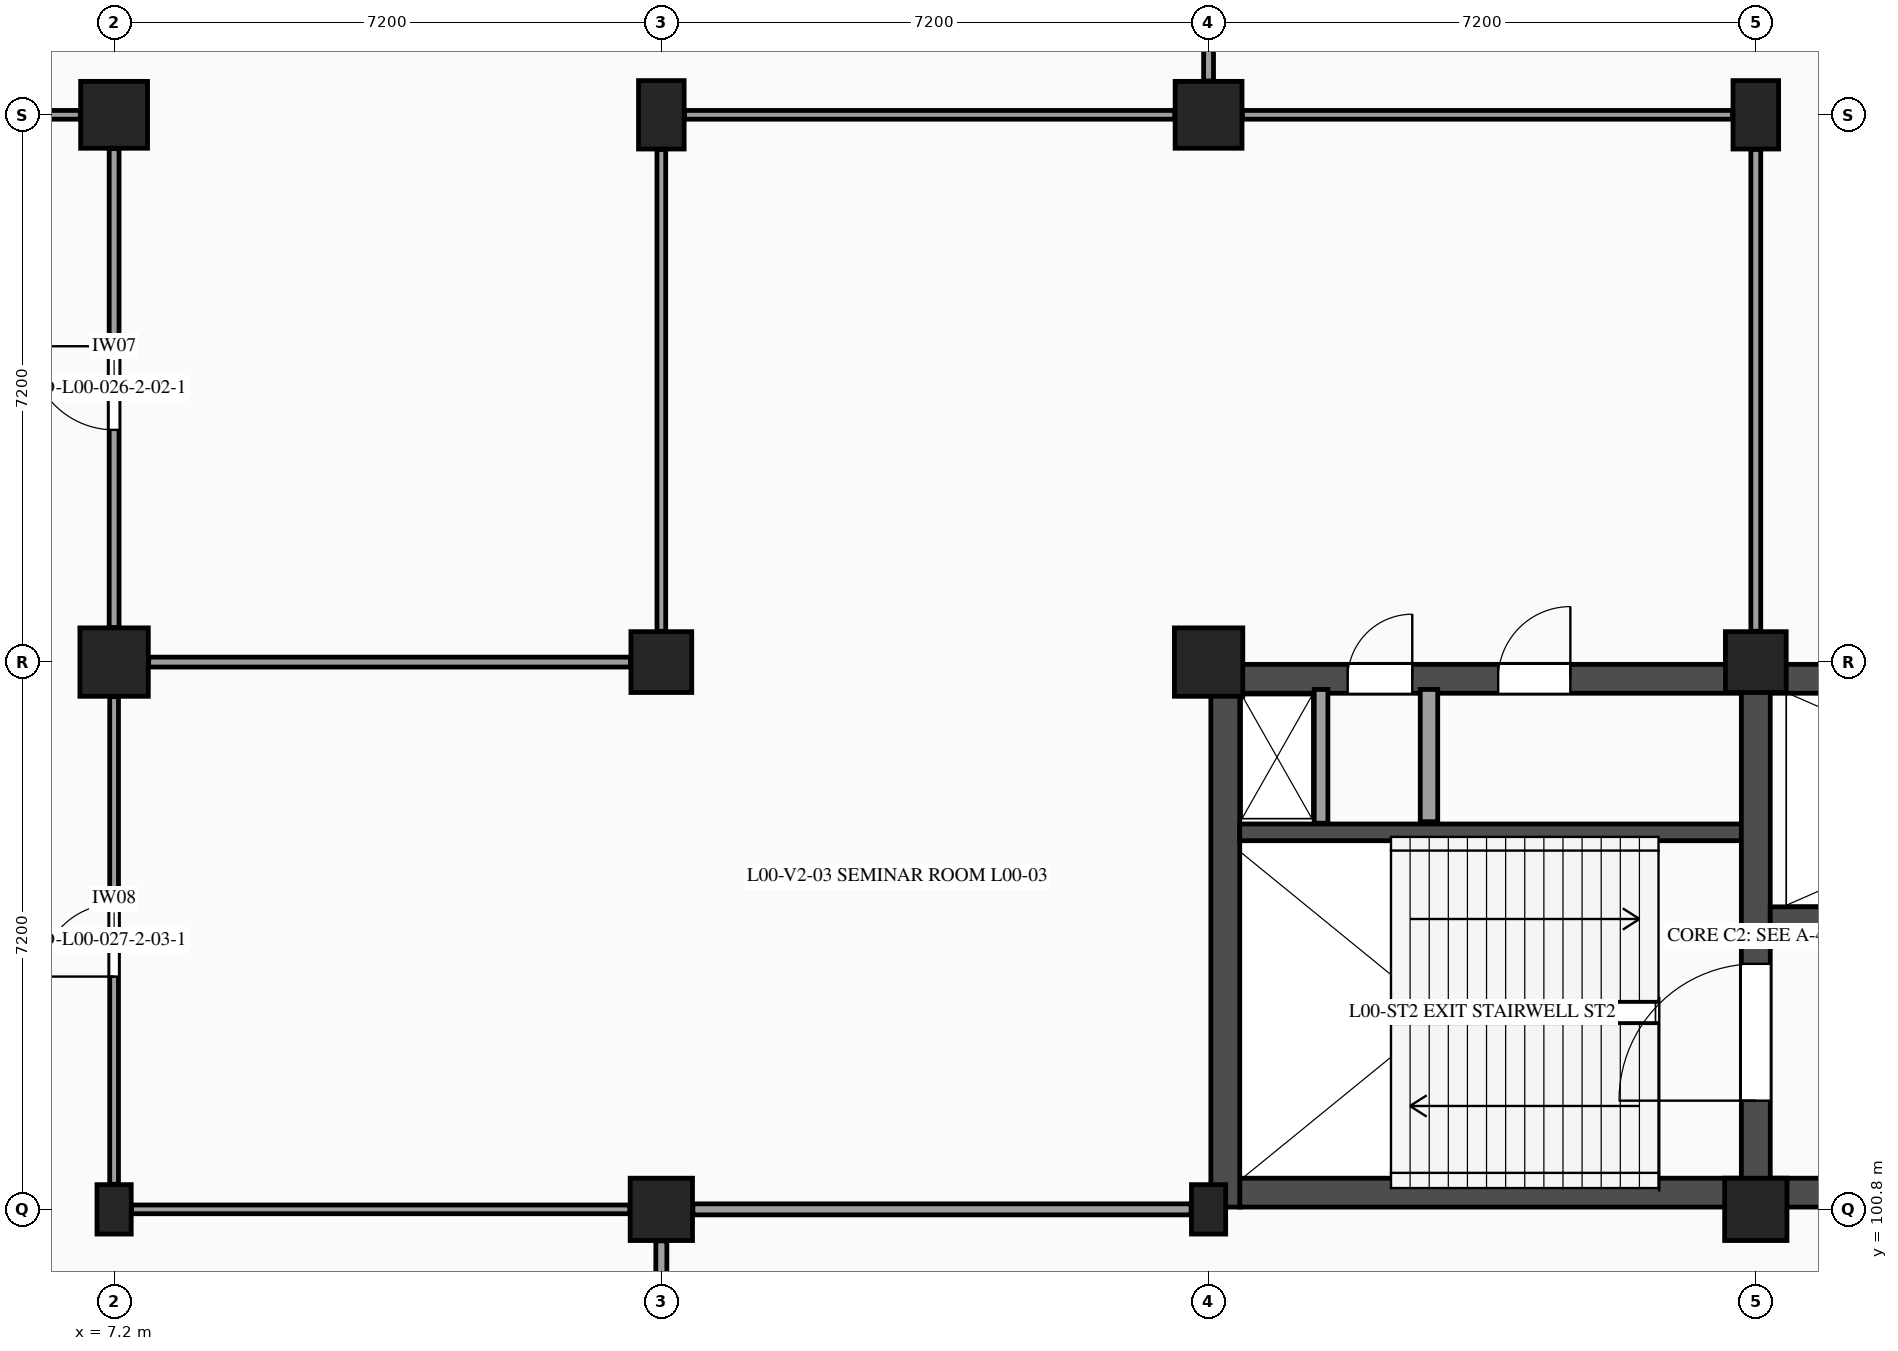
"""IFC4 building model, lengths in metres.
Left out: names, types, materials, properties, quantities, classifications, styles, units other than length and angle.
Written with IfcOpenShell. Run it as: python <this file> out.ifc"""

import sys

from ifc_helpers import new_model, si_unit, direction, frame, frame_2d, origin, origin_2d, place, context, subcontext, project, spatial, rectangle, extrude, element, fill, save


model = new_model("IFC4")
c1 = context("Model", 3, precision=1e-05, world=origin(), true_north=direction((0.0, 1.0)))
c2 = subcontext(c1, "Body", "Model", "MODEL_VIEW")
j1 = project(units=[si_unit("LENGTHUNIT", "METRE"), si_unit("PLANEANGLEUNIT", "RADIAN")], contexts=[c1])
p1 = place(None, origin())
s1 = spatial("IfcSite", under=j1, at=p1, CompositionType="ELEMENT")
p2 = place(p1, origin())
s2 = spatial("IfcBuilding", under=s1, at=p2, CompositionType="ELEMENT")
p3 = place(p2, origin())
s3 = spatial("IfcBuildingStorey", under=s2, at=p3, CompositionType="ELEMENT", Elevation=0.0)
p4 = place(p3, frame((7.2, 100.8, 0.0), z_axis=(0.0, 0.0, 1.0), x_axis=(1.0, 0.0, 0.0)))
e1 = element("IfcColumn", 1, at=p4, inside=s3, PredefinedType="PILASTER", context=c2, shape_type="SweptSolid", body=[
    extrude(rectangle(XDim=0.45, YDim=0.65, at=origin_2d()), origin(), (0.0, 0.0, 1.0), 5.4),
])
p5 = place(p3, frame((7.2, 108.0, 0.0), z_axis=(0.0, 0.0, 1.0), x_axis=(1.0, 0.0, 0.0)))
e2 = element("IfcColumn", 2, at=p5, inside=s3, PredefinedType="COLUMN", context=c2, shape_type="SweptSolid", body=[
    extrude(rectangle(XDim=0.9, YDim=0.9, at=origin_2d()), origin(), (0.0, 0.0, 1.0), 5.4),
])
p6 = place(p3, frame((7.2, 115.2, 0.0), z_axis=(0.0, 0.0, 1.0), x_axis=(1.0, 0.0, 0.0)))
e3 = element("IfcColumn", 3, at=p6, inside=s3, PredefinedType="COLUMN", context=c2, shape_type="SweptSolid", body=[
    extrude(rectangle(XDim=0.88, YDim=0.88, at=origin_2d()), origin(), (0.0, 0.0, 1.0), 5.4),
])
p7 = place(p3, frame((14.4, 100.8, 0.0), z_axis=(0.0, 0.0, 1.0), x_axis=(1.0, 0.0, 0.0)))
e4 = element("IfcColumn", 4, at=p7, inside=s3, PredefinedType="COLUMN", context=c2, shape_type="SweptSolid", body=[
    extrude(rectangle(XDim=0.82, YDim=0.82, at=origin_2d()), origin(), (0.0, 0.0, 1.0), 5.4),
])
p8 = place(p3, frame((14.4, 108.0, 0.0), z_axis=(0.0, 0.0, 1.0), x_axis=(1.0, 0.0, 0.0)))
e5 = element("IfcColumn", 5, at=p8, inside=s3, PredefinedType="COLUMN", context=c2, shape_type="SweptSolid", body=[
    extrude(rectangle(XDim=0.8, YDim=0.8, at=origin_2d()), origin(), (0.0, 0.0, 1.0), 5.4),
])
p9 = place(p3, frame((14.4, 115.2, 0.0), z_axis=(0.0, 0.0, 1.0), x_axis=(1.0, 0.0, 0.0)))
e6 = element("IfcColumn", 6, at=p9, inside=s3, PredefinedType="COLUMN", context=c2, shape_type="SweptSolid", body=[
    extrude(rectangle(XDim=0.6, YDim=0.9, at=origin_2d()), origin(), (0.0, 0.0, 1.0), 5.4),
])
p10 = place(p3, frame((21.6, 100.8, 0.0), z_axis=(0.0, 0.0, 1.0), x_axis=(1.0, 0.0, 0.0)))
e7 = element("IfcColumn", 7, at=p10, inside=s3, PredefinedType="PILASTER", context=c2, shape_type="SweptSolid", body=[
    extrude(rectangle(XDim=0.45, YDim=0.65, at=origin_2d()), origin(), (0.0, 0.0, 1.0), 5.4),
])
p11 = place(p3, frame((21.6, 108.0, 0.0), z_axis=(0.0, 0.0, 1.0), x_axis=(1.0, 0.0, 0.0)))
e8 = element("IfcColumn", 8, at=p11, inside=s3, PredefinedType="COLUMN", context=c2, shape_type="SweptSolid", body=[
    extrude(rectangle(XDim=0.9, YDim=0.9, at=origin_2d()), origin(), (0.0, 0.0, 1.0), 5.4),
])
p12 = place(p3, frame((21.6, 115.2, 0.0), z_axis=(0.0, 0.0, 1.0), x_axis=(1.0, 0.0, 0.0)))
e9 = element("IfcColumn", 9, at=p12, inside=s3, PredefinedType="COLUMN", context=c2, shape_type="SweptSolid", body=[
    extrude(rectangle(XDim=0.88, YDim=0.88, at=origin_2d()), origin(), (0.0, 0.0, 1.0), 5.4),
])
p13 = place(p3, frame((28.8, 100.8, 0.0), z_axis=(0.0, 0.0, 1.0), x_axis=(1.0, 0.0, 0.0)))
e10 = element("IfcColumn", 10, at=p13, inside=s3, PredefinedType="COLUMN", context=c2, shape_type="SweptSolid", body=[
    extrude(rectangle(XDim=0.82, YDim=0.82, at=origin_2d()), origin(), (0.0, 0.0, 1.0), 5.4),
])
p14 = place(p3, frame((28.8, 108.0, 0.0), z_axis=(0.0, 0.0, 1.0), x_axis=(1.0, 0.0, 0.0)))
e11 = element("IfcColumn", 11, at=p14, inside=s3, PredefinedType="COLUMN", context=c2, shape_type="SweptSolid", body=[
    extrude(rectangle(XDim=0.8, YDim=0.8, at=origin_2d()), origin(), (0.0, 0.0, 1.0), 5.4),
])
p15 = place(p3, frame((28.8, 115.2, 0.0), z_axis=(0.0, 0.0, 1.0), x_axis=(1.0, 0.0, 0.0)))
e12 = element("IfcColumn", 12, at=p15, inside=s3, PredefinedType="COLUMN", context=c2, shape_type="SweptSolid", body=[
    extrude(rectangle(XDim=0.6, YDim=0.9, at=origin_2d()), origin(), (0.0, 0.0, 1.0), 5.4),
])
p16 = place(p3, frame((22.01, 101.02, 0.0), z_axis=(0.0, 0.0, 1.0), x_axis=(1.0, 0.0, 0.0)))
e13 = element("IfcWall", 13, at=p16, inside=s3, PredefinedType="SHEAR", context=c2, shape_type="SweptSolid", body=[
    extrude(rectangle(XDim=6.6, YDim=0.38, at=frame_2d((3.3, 0.0))), origin(), (0.0, 0.0, 1.0), 5.09),
])
p17 = place(p3, frame((21.82, 107.97, 0.0), z_axis=(0.0, 0.0, 1.0), x_axis=(0.0, -1.0, 0.0)))
e14 = element("IfcWall", 14, at=p17, inside=s3, PredefinedType="SHEAR", context=c2, shape_type="SweptSolid", body=[
    extrude(rectangle(XDim=7.14, YDim=0.38, at=frame_2d((3.57, 0.0))), origin(), (0.0, 0.0, 1.0), 5.09),
])
p18 = place(p3, frame((22.01, 107.78, 0.0), z_axis=(0.0, 0.0, 1.0), x_axis=(1.0, 0.0, 0.0)))
e15 = element("IfcWall", 15, at=p18, inside=s3, PredefinedType="SHEAR", context=c2, shape_type="SweptSolid", body=[
    extrude(rectangle(XDim=6.6, YDim=0.38, at=frame_2d((3.3, 0.0))), origin(), (0.0, 0.0, 1.0), 5.09),
])
p19 = place(p18, frame((1.42, 0.0, 0.0)))
e16 = element("IfcOpeningElement", 16, at=p19, cuts=e15, PredefinedType="OPENING", context=c2, shape_type="SweptSolid", body=[
    extrude(rectangle(XDim=0.85, YDim=2.1, at=frame_2d((0.425, 1.05))), frame((0.0, 0.2, 0.0), z_axis=(0.0, -1.0, 0.0), x_axis=(1.0, 0.0, 0.0)), (0.0, 0.0, 1.0), 0.4),
])
p20 = place(p18, frame((3.4, 0.0, 0.0)))
e17 = element("IfcOpeningElement", 17, at=p20, cuts=e15, PredefinedType="OPENING", context=c2, shape_type="SweptSolid", body=[
    extrude(rectangle(XDim=0.95, YDim=2.15, at=frame_2d((0.475, 1.075))), frame((0.0, 0.2, 0.0), z_axis=(0.0, -1.0, 0.0), x_axis=(1.0, 0.0, 0.0)), (0.0, 0.0, 1.0), 0.4),
])
p21 = place(p3, frame((22.01, 105.76, 0.0), z_axis=(0.0, 0.0, 1.0), x_axis=(1.0, 0.0, 0.0)))
e18 = element("IfcWall", 18, at=p21, inside=s3, PredefinedType="SHEAR", context=c2, shape_type="SweptSolid", body=[
    extrude(rectangle(XDim=6.6, YDim=0.22, at=frame_2d((3.3, 0.0))), origin(), (0.0, 0.0, 1.0), 5.09),
])
p22 = place(p3, frame((24.5, 105.9, 0.0), z_axis=(0.0, 0.0, 1.0), x_axis=(0.0, 1.0, 0.0)))
e19 = element("IfcWall", 19, at=p22, inside=s3, PredefinedType="PARTITIONING", context=c2, shape_type="SweptSolid", body=[
    extrude(rectangle(XDim=1.74, YDim=0.23, at=frame_2d((0.87, 0.0))), origin(), (0.0, 0.0, 1.0), 5.09),
])
p23 = place(p3, frame((23.08, 105.88, 0.0), z_axis=(0.0, 0.0, 1.0), x_axis=(0.0, 1.0, 0.0)))
e20 = element("IfcWall", 20, at=p23, inside=s3, PredefinedType="PARTITIONING", context=c2, shape_type="SweptSolid", body=[
    extrude(rectangle(XDim=1.76, YDim=0.18, at=frame_2d((0.88, 0.0))), origin(), (0.0, 0.0, 1.0), 5.09),
])
p24 = place(p3, frame((28.8, 100.83, 0.0), z_axis=(0.0, 0.0, 1.0), x_axis=(0.0, 1.0, 0.0)))
e21 = element("IfcWall", 21, at=p24, inside=s3, PredefinedType="SHEAR", context=c2, shape_type="SweptSolid", body=[
    extrude(rectangle(XDim=7.14, YDim=0.38, at=frame_2d((3.57, 0.0))), origin(), (0.0, 0.0, 1.0), 5.09),
])
p25 = place(p24, frame((1.4, 0.0, 0.0)))
e22 = element("IfcOpeningElement", 22, at=p25, cuts=e21, PredefinedType="OPENING", context=c2, shape_type="SweptSolid", body=[
    extrude(rectangle(XDim=1.8, YDim=2.2, at=frame_2d((0.9, 1.1))), frame((0.0, 0.2, 0.0), z_axis=(0.0, -1.0, 0.0), x_axis=(1.0, 0.0, 0.0)), (0.0, 0.0, 1.0), 0.4),
])
p26 = place(p3, frame((28.99, 101.02, 0.0), z_axis=(0.0, 0.0, 1.0), x_axis=(1.0, 0.0, 0.0)))
e23 = element("IfcWall", 23, at=p26, inside=s3, PredefinedType="SHEAR", context=c2, shape_type="SweptSolid", body=[
    extrude(rectangle(XDim=6.6, YDim=0.38, at=frame_2d((3.3, 0.0))), origin(), (0.0, 0.0, 1.0), 5.09),
])
p27 = place(p26, frame((2.22, 0.0, 0.0)))
e24 = element("IfcOpeningElement", 24, at=p27, cuts=e23, PredefinedType="OPENING", context=c2, shape_type="SweptSolid", body=[
    extrude(rectangle(XDim=1.8, YDim=2.2, at=frame_2d((0.9, 1.1))), frame((0.0, 0.2, 0.0), z_axis=(0.0, -1.0, 0.0), x_axis=(1.0, 0.0, 0.0)), (0.0, 0.0, 1.0), 0.4),
])
p28 = place(p3, frame((28.99, 107.78, 0.0), z_axis=(0.0, 0.0, 1.0), x_axis=(1.0, 0.0, 0.0)))
e25 = element("IfcWall", 25, at=p28, inside=s3, PredefinedType="SHEAR", context=c2, shape_type="SweptSolid", body=[
    extrude(rectangle(XDim=6.6, YDim=0.38, at=frame_2d((3.3, 0.0))), origin(), (0.0, 0.0, 1.0), 5.09),
])
p29 = place(p3, frame((28.99, 104.65, 0.0), z_axis=(0.0, 0.0, 1.0), x_axis=(1.0, 0.0, 0.0)))
e26 = element("IfcWall", 26, at=p29, inside=s3, PredefinedType="SHEAR", context=c2, shape_type="SweptSolid", body=[
    extrude(rectangle(XDim=6.6, YDim=0.26, at=frame_2d((3.3, 0.0))), origin(), (0.0, 0.0, 1.0), 5.09),
])
p30 = place(p29, frame((0.95, 0.0, 0.0)))
e27 = element("IfcOpeningElement", 27, at=p30, cuts=e26, PredefinedType="OPENING", context=c2, shape_type="SweptSolid", body=[
    extrude(rectangle(XDim=1.1, YDim=2.2, at=frame_2d((0.55, 1.1))), frame((0.0, 0.14, 0.0), z_axis=(0.0, -1.0, 0.0), x_axis=(1.0, 0.0, 0.0)), (0.0, 0.0, 1.0), 0.28),
])
p31 = place(p29, frame((4.1, 0.0, 0.0)))
e28 = element("IfcOpeningElement", 28, at=p31, cuts=e26, PredefinedType="OPENING", context=c2, shape_type="SweptSolid", body=[
    extrude(rectangle(XDim=1.0, YDim=2.15, at=frame_2d((0.5, 1.075))), frame((0.0, 0.14, 0.0), z_axis=(0.0, -1.0, 0.0), x_axis=(1.0, 0.0, 0.0)), (0.0, 0.0, 1.0), 0.28),
])
p32 = place(p3, frame((7.2, 101.13, 0.0), z_axis=(0.0, 0.0, 1.0), x_axis=(0.0, 1.0, 0.0)))
e29 = element("IfcWall", 29, at=p32, inside=s3, PredefinedType="PARTITIONING", context=c2, shape_type="SweptSolid", body=[
    extrude(rectangle(XDim=6.415, YDim=0.115, at=frame_2d((3.208, 0.0))), origin(), (0.0, 0.0, 1.0), 4.455),
])
p33 = place(p32, frame((2.732, 0.0, 0.0)))
e30 = element("IfcOpeningElement", 30, at=p33, cuts=e29, PredefinedType="OPENING", context=c2, shape_type="SweptSolid", body=[
    extrude(rectangle(XDim=0.95, YDim=2.15, at=frame_2d((0.475, 1.075))), frame((0.0, 0.067, 0.0), z_axis=(0.0, -1.0, 0.0), x_axis=(1.0, 0.0, 0.0)), (0.0, 0.0, 1.0), 0.135),
])
p34 = place(p3, frame((7.2, 108.455, 0.0), z_axis=(0.0, 0.0, 1.0), x_axis=(0.0, 1.0, 0.0)))
e31 = element("IfcWall", 31, at=p34, inside=s3, PredefinedType="PARTITIONING", context=c2, shape_type="SweptSolid", body=[
    extrude(rectangle(XDim=6.3, YDim=0.13, at=frame_2d((3.15, 0.0))), origin(), (0.0, 0.0, 1.0), 4.405),
])
p35 = place(p34, frame((2.6, 0.0, 0.0)))
e32 = element("IfcOpeningElement", 32, at=p35, cuts=e31, PredefinedType="OPENING", context=c2, shape_type="SweptSolid", body=[
    extrude(rectangle(XDim=1.1, YDim=2.15, at=frame_2d((0.55, 1.075))), frame((0.0, 0.075, 0.0), z_axis=(0.0, -1.0, 0.0), x_axis=(1.0, 0.0, 0.0)), (0.0, 0.0, 1.0), 0.15),
])
p36 = place(p3, frame((0.305, 115.2, 0.0), z_axis=(0.0, 0.0, 1.0), x_axis=(1.0, 0.0, 0.0)))
e33 = element("IfcWall", 33, at=p36, inside=s3, PredefinedType="PARTITIONING", context=c2, shape_type="SweptSolid", body=[
    extrude(rectangle(XDim=6.45, YDim=0.115, at=frame_2d((3.225, 0.0))), origin(), (0.0, 0.0, 1.0), 4.31),
])
p37 = place(p3, frame((14.4, 94.045, 0.0), z_axis=(0.0, 0.0, 1.0), x_axis=(0.0, 1.0, 0.0)))
e34 = element("IfcWall", 34, at=p37, inside=s3, PredefinedType="PARTITIONING", context=c2, shape_type="SweptSolid", body=[
    extrude(rectangle(XDim=6.34, YDim=0.145, at=frame_2d((3.17, 0.0))), origin(), (0.0, 0.0, 1.0), 4.46),
])
p38 = place(p37, frame((2.37, 0.0, 0.0)))
e35 = element("IfcOpeningElement", 35, at=p38, cuts=e34, PredefinedType="OPENING", context=c2, shape_type="SweptSolid", body=[
    extrude(rectangle(XDim=1.6, YDim=2.2, at=frame_2d((0.8, 1.1))), frame((0.0, 0.083, 0.0), z_axis=(0.0, -1.0, 0.0), x_axis=(1.0, 0.0, 0.0)), (0.0, 0.0, 1.0), 0.165),
])
p39 = place(p3, frame((7.43, 100.8, 0.0), z_axis=(0.0, 0.0, 1.0), x_axis=(1.0, 0.0, 0.0)))
e36 = element("IfcWall", 36, at=p39, inside=s3, PredefinedType="PARTITIONING", context=c2, shape_type="SweptSolid", body=[
    extrude(rectangle(XDim=6.555, YDim=0.115, at=frame_2d((3.278, 0.0))), origin(), (0.0, 0.0, 1.0), 4.34),
])
p40 = place(p3, frame((7.655, 108.0, 0.0), z_axis=(0.0, 0.0, 1.0), x_axis=(1.0, 0.0, 0.0)))
e37 = element("IfcWall", 37, at=p40, inside=s3, PredefinedType="PARTITIONING", context=c2, shape_type="SweptSolid", body=[
    extrude(rectangle(XDim=6.34, YDim=0.13, at=frame_2d((3.17, 0.0))), origin(), (0.0, 0.0, 1.0), 4.34),
])
p41 = place(p3, frame((14.4, 108.405, 0.0), z_axis=(0.0, 0.0, 1.0), x_axis=(0.0, 1.0, 0.0)))
e38 = element("IfcWall", 38, at=p41, inside=s3, PredefinedType="PARTITIONING", context=c2, shape_type="SweptSolid", body=[
    extrude(rectangle(XDim=6.34, YDim=0.115, at=frame_2d((3.17, 0.0))), origin(), (0.0, 0.0, 1.0), 4.405),
])
p42 = place(p3, frame((14.815, 100.8, 0.0), z_axis=(0.0, 0.0, 1.0), x_axis=(1.0, 0.0, 0.0)))
e39 = element("IfcWall", 39, at=p42, inside=s3, PredefinedType="PARTITIONING", context=c2, shape_type="SweptSolid", body=[
    extrude(rectangle(XDim=6.555, YDim=0.145, at=frame_2d((3.278, 0.0))), origin(), (0.0, 0.0, 1.0), 4.35),
])
p43 = place(p3, frame((14.705, 115.2, 0.0), z_axis=(0.0, 0.0, 1.0), x_axis=(1.0, 0.0, 0.0)))
e40 = element("IfcWall", 40, at=p43, inside=s3, PredefinedType="PARTITIONING", context=c2, shape_type="SweptSolid", body=[
    extrude(rectangle(XDim=6.45, YDim=0.115, at=frame_2d((3.225, 0.0))), origin(), (0.0, 0.0, 1.0), 4.35),
])
p44 = place(p3, frame((21.6, 115.645, 0.0), z_axis=(0.0, 0.0, 1.0), x_axis=(0.0, 1.0, 0.0)))
e41 = element("IfcWall", 41, at=p44, inside=s3, PredefinedType="PARTITIONING", context=c2, shape_type="SweptSolid", body=[
    extrude(rectangle(XDim=6.34, YDim=0.13, at=frame_2d((3.17, 0.0))), origin(), (0.0, 0.0, 1.0), 4.405),
])
p45 = place(p44, frame((2.21, 0.0, 0.0)))
e42 = element("IfcOpeningElement", 42, at=p45, cuts=e41, PredefinedType="OPENING", context=c2, shape_type="SweptSolid", body=[
    extrude(rectangle(XDim=1.92, YDim=2.35, at=frame_2d((0.96, 1.175))), frame((0.0, 0.075, 0.0), z_axis=(0.0, -1.0, 0.0), x_axis=(1.0, 0.0, 0.0)), (0.0, 0.0, 1.0), 0.15),
])
p46 = place(p3, frame((28.8, 108.405, 0.0), z_axis=(0.0, 0.0, 1.0), x_axis=(0.0, 1.0, 0.0)))
e43 = element("IfcWall", 43, at=p46, inside=s3, PredefinedType="PARTITIONING", context=c2, shape_type="SweptSolid", body=[
    extrude(rectangle(XDim=6.34, YDim=0.13, at=frame_2d((3.17, 0.0))), origin(), (0.0, 0.0, 1.0), 4.405),
])
p47 = place(p3, frame((22.045, 115.2, 0.0), z_axis=(0.0, 0.0, 1.0), x_axis=(1.0, 0.0, 0.0)))
e44 = element("IfcWall", 44, at=p47, inside=s3, PredefinedType="PARTITIONING", context=c2, shape_type="SweptSolid", body=[
    extrude(rectangle(XDim=6.45, YDim=0.115, at=frame_2d((3.225, 0.0))), origin(), (0.0, 0.0, 1.0), 4.365),
])
p48 = place(p19, origin())
e45 = element("IfcDoor", 45, at=p48, inside=s3, OperationType="SINGLE_SWING_RIGHT", PredefinedType="DOOR", context=c2, shape_type="SweptSolid", body=[
    extrude(rectangle(XDim=0.85, YDim=2.1, at=frame_2d((0.425, 1.05))), frame((0.0, 0.025, 0.0), z_axis=(0.0, -1.0, 0.0), x_axis=(1.0, 0.0, 0.0)), (0.0, 0.0, 1.0), 0.05),
])
fill(e16, e45)
p49 = place(p25, frame((1.8, 0.0, 0.0), z_axis=(0.0, 0.0, 1.0), x_axis=(-1.0, 0.0, 0.0)))
e46 = element("IfcDoor", 46, at=p49, inside=s3, OperationType="SINGLE_SWING_LEFT", PredefinedType="DOOR", context=c2, shape_type="SweptSolid", body=[
    extrude(rectangle(XDim=1.8, YDim=2.2, at=frame_2d((0.9, 1.1))), frame((0.0, 0.025, 0.0), z_axis=(0.0, -1.0, 0.0), x_axis=(1.0, 0.0, 0.0)), (0.0, 0.0, 1.0), 0.05),
])
fill(e22, e46)
p50 = place(p20, origin())
e47 = element("IfcDoor", 47, at=p50, inside=s3, OperationType="SINGLE_SWING_RIGHT", PredefinedType="DOOR", context=c2, shape_type="SweptSolid", body=[
    extrude(rectangle(XDim=0.95, YDim=2.15, at=frame_2d((0.475, 1.075))), frame((0.0, 0.025, 0.0), z_axis=(0.0, -1.0, 0.0), x_axis=(1.0, 0.0, 0.0)), (0.0, 0.0, 1.0), 0.05),
])
fill(e17, e47)
p51 = place(p35, origin())
e48 = element("IfcDoor", 48, at=p51, inside=s3, OperationType="SINGLE_SWING_RIGHT", PredefinedType="DOOR", context=c2, shape_type="SweptSolid", body=[
    extrude(rectangle(XDim=1.1, YDim=2.15, at=frame_2d((0.55, 1.075))), frame((0.0, 0.025, 0.0), z_axis=(0.0, -1.0, 0.0), x_axis=(1.0, 0.0, 0.0)), (0.0, 0.0, 1.0), 0.05),
])
fill(e32, e48)
p52 = place(p33, origin())
e49 = element("IfcDoor", 49, at=p52, inside=s3, OperationType="SINGLE_SWING_LEFT", PredefinedType="DOOR", context=c2, shape_type="SweptSolid", body=[
    extrude(rectangle(XDim=0.95, YDim=2.15, at=frame_2d((0.475, 1.075))), frame((0.0, 0.025, 0.0), z_axis=(0.0, -1.0, 0.0), x_axis=(1.0, 0.0, 0.0)), (0.0, 0.0, 1.0), 0.05),
])
fill(e30, e49)
save(model, sys.argv[1])
